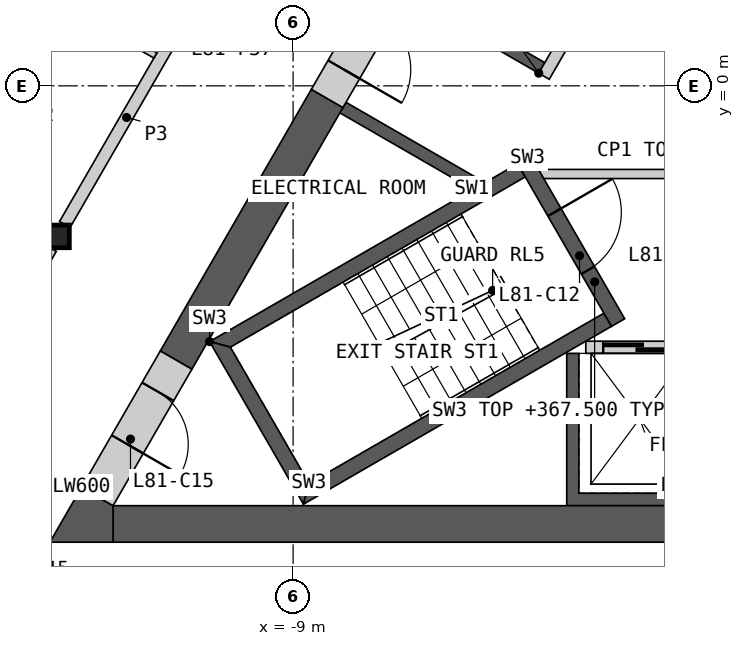
"""IFC4 building model, lengths in metres.
Left out: names, types, materials, properties, quantities, classifications, styles, units other than length and angle.
Written with IfcOpenShell. Run it as: python <this file> out.ifc"""

import sys

from ifc_helpers import new_model, si_unit, direction, frame, frame_2d, origin, origin_2d, place, context, subcontext, project, spatial, polyline, rectangle, i_section, outline, extrude, element, fill, save


model = new_model("IFC4")
c1 = context("Model", 3, precision=1e-05, world=origin(), true_north=direction((0.0, 1.0)))
c2 = subcontext(c1, "Body", "Model", "MODEL_VIEW")
j1 = project(units=[si_unit("LENGTHUNIT", "METRE"), si_unit("PLANEANGLEUNIT", "RADIAN")], contexts=[c1])
p1 = place(None, origin())
s1 = spatial("IfcSite", under=j1, at=p1, CompositionType="ELEMENT")
p2 = place(p1, origin())
s2 = spatial("IfcBuilding", under=s1, at=p2, CompositionType="ELEMENT")
p3 = place(p2, frame((0.0, 0.0, 364.4)))
s3 = spatial("IfcBuildingStorey", under=s2, at=p3, CompositionType="ELEMENT", Elevation=364.4)
p4 = place(p3, frame((-12.868, -2.476, 0.0), z_axis=(0.0, 0.0, 1.0), x_axis=(1.0, 0.0, 0.0)))
e1 = element("IfcColumn", 1, at=p4, inside=s3, PredefinedType="COLUMN", context=c2, shape_type="SweptSolid", body=[
    extrude(i_section(OverallWidth=0.374, OverallDepth=0.372, WebThickness=0.016, FlangeThickness=0.026, at=origin_2d()), origin(), (0.0, 0.0, 1.0), 3.4),
])
p5 = place(p3, origin())
e2 = element("IfcWall", 2, at=p5, inside=s3, PredefinedType="SHEAR", context=c2, shape_type="SweptSolid", body=[
    extrude(outline(polyline([(4.5, -4.4), (4.5, -6.906), (-4.5, -6.906), (-4.5, -4.4), (-4.3, -4.4), (-4.3, -6.7), (-2.3, -6.7), (-2.3, -4.4), (-2.1, -4.4), (-2.1, -6.7), (-0.1, -6.7), (-0.1, -4.4), (0.1, -4.4), (0.1, -6.7), (2.1, -6.7), (2.1, -4.4), (2.3, -4.4), (2.3, -6.7), (4.3, -6.7), (4.3, -4.4), (4.5, -4.4)])), origin(), (0.0, 0.0, 1.0), 3.1),
])
p6 = place(p3, frame((-4.187, -4.3, 0.0), z_axis=(0.0, 0.0, 1.0), x_axis=(1.0, 0.0, 0.0)))
e3 = element("IfcWall", 3, at=p6, inside=s3, PredefinedType="SOLIDWALL", context=c2, shape_type="SweptSolid", body=[
    extrude(rectangle(XDim=8.373, YDim=0.2, at=frame_2d((4.187, 0.0))), origin(), (0.0, 0.0, 1.0), 3.1),
])
p7 = place(p6, frame((0.287, 0.0, 0.0)))
e4 = element("IfcOpeningElement", 4, at=p7, cuts=e3, PredefinedType="OPENING", context=c2, shape_type="SweptSolid", body=[
    extrude(rectangle(XDim=1.2, YDim=2.1, at=frame_2d((0.6, 1.05))), frame((0.0, 0.11, 0.0), z_axis=(0.0, -1.0, 0.0), x_axis=(1.0, 0.0, 0.0)), (0.0, 0.0, 1.0), 0.22),
])
p8 = place(p6, frame((2.387, 0.0, 0.0)))
e5 = element("IfcOpeningElement", 5, at=p8, cuts=e3, PredefinedType="OPENING", context=c2, shape_type="SweptSolid", body=[
    extrude(rectangle(XDim=1.4, YDim=2.1, at=frame_2d((0.7, 1.05))), frame((0.0, 0.11, 0.0), z_axis=(0.0, -1.0, 0.0), x_axis=(1.0, 0.0, 0.0)), (0.0, 0.0, 1.0), 0.22),
])
p9 = place(p6, frame((4.737, 0.0, 0.0)))
e6 = element("IfcOpeningElement", 6, at=p9, cuts=e3, PredefinedType="OPENING", context=c2, shape_type="SweptSolid", body=[
    extrude(rectangle(XDim=1.1, YDim=2.1, at=frame_2d((0.55, 1.05))), frame((0.0, 0.11, 0.0), z_axis=(0.0, -1.0, 0.0), x_axis=(1.0, 0.0, 0.0)), (0.0, 0.0, 1.0), 0.22),
])
p10 = place(p6, frame((6.887, 0.0, 0.0)))
e7 = element("IfcOpeningElement", 7, at=p10, cuts=e3, PredefinedType="OPENING", context=c2, shape_type="SweptSolid", body=[
    extrude(rectangle(XDim=1.2, YDim=2.1, at=frame_2d((0.6, 1.05))), frame((0.0, 0.11, 0.0), z_axis=(0.0, -1.0, 0.0), x_axis=(1.0, 0.0, 0.0)), (0.0, 0.0, 1.0), 0.22),
])
p11 = place(p3, origin())
e8 = element("IfcWall", 8, at=p11, inside=s3, PredefinedType="SHEAR", context=c2, shape_type="SweptSolid", body=[
    extrude(outline(polyline([(-6.061, -1.697), (-8.231, -0.444), (-8.131, -0.271), (-5.96, -1.524), (-6.061, -1.697)])), origin(), (0.0, 0.0, 1.0), 3.1),
])
p12 = place(p3, origin())
e9 = element("IfcWall", 9, at=p12, inside=s3, PredefinedType="SHEAR", context=c2, shape_type="SweptSolid", body=[
    extrude(outline(polyline([(-4.96, 0.208), (-7.131, 1.461), (-3.731, 7.35), (-1.561, 6.097), (-1.66, 5.924), (-3.652, 7.074), (-5.752, 3.437), (-3.76, 2.287), (-3.861, 2.113), (-5.852, 3.263), (-6.852, 1.531), (-4.861, 0.381), (-4.96, 0.208)])), origin(), (0.0, 0.0, 1.0), 3.1),
])
p13 = place(p3, frame((-1.631, 5.776, 0.0), z_axis=(0.0, 0.0, 1.0), x_axis=(-0.499992876559, -0.866029516466, 0.0)))
e10 = element("IfcWall", 10, at=p13, inside=s3, PredefinedType="SOLIDWALL", context=c2, shape_type="SweptSolid", body=[
    extrude(rectangle(XDim=6.486, YDim=0.2, at=frame_2d((3.243, 0.0))), origin(), (0.0, 0.0, 1.0), 3.1),
])
p14 = place(p13, frame((1.537, 0.0, 0.0)))
e11 = element("IfcOpeningElement", 11, at=p14, cuts=e10, PredefinedType="OPENING", context=c2, shape_type="SweptSolid", body=[
    extrude(rectangle(XDim=0.9, YDim=2.1, at=frame_2d((0.45, 1.05))), frame((0.0, 0.11, 0.0), z_axis=(0.0, -1.0, 0.0), x_axis=(1.0, 0.0, 0.0)), (0.0, 0.0, 1.0), 0.22),
])
p15 = place(p13, frame((4.837, 0.0, 0.0)))
e12 = element("IfcOpeningElement", 12, at=p15, cuts=e10, PredefinedType="OPENING", context=c2, shape_type="SweptSolid", body=[
    extrude(rectangle(XDim=0.9, YDim=2.1, at=frame_2d((0.45, 1.05))), frame((0.0, 0.11, 0.0), z_axis=(0.0, -1.0, 0.0), x_axis=(1.0, 0.0, 0.0)), (0.0, 0.0, 1.0), 0.22),
])
p16 = place(p3, frame((-4.941, -1.45, 0.0), z_axis=(0.0, 0.0, 1.0), x_axis=(1.0, 0.0, 0.0)))
e13 = element("IfcWall", 13, at=p16, inside=s3, PredefinedType="PARTITIONING", context=c2, shape_type="SweptSolid", body=[
    extrude(rectangle(XDim=9.882, YDim=0.15, at=frame_2d((4.941, 0.0))), origin(), (0.0, 0.0, 1.0), 3.1),
])
p17 = place(p16, frame((4.391, 0.0, 0.0)))
e14 = element("IfcOpeningElement", 14, at=p17, cuts=e13, PredefinedType="OPENING", context=c2, shape_type="SweptSolid", body=[
    extrude(rectangle(XDim=1.1, YDim=2.1, at=frame_2d((0.55, 1.05))), frame((0.0, 0.085, 0.0), z_axis=(0.0, -1.0, 0.0), x_axis=(1.0, 0.0, 0.0)), (0.0, 0.0, 1.0), 0.17),
])
p18 = place(p3, origin())
e15 = element("IfcWall", 15, at=p18, inside=s3, PredefinedType="SHEAR", context=c2, shape_type="SweptSolid", body=[
    extrude(outline(polyline([(-5.307, -1.281), (-10.374, -4.206), (-10.032, -4.298), (-5.182, -1.498), (-5.307, -1.281)])), origin(), (0.0, 0.0, 1.0), 3.1),
])
p19 = place(p3, origin())
e16 = element("IfcWall", 16, at=p19, inside=s3, PredefinedType="SHEAR", context=c2, shape_type="SweptSolid", body=[
    extrude(outline(polyline([(-10.374, -4.206), (-8.83, -6.881), (-8.738, -6.539), (-10.032, -4.298), (-10.374, -4.206)])), origin(), (0.0, 0.0, 1.0), 3.1),
])
p20 = place(p3, origin())
e17 = element("IfcWall", 17, at=p20, inside=s3, PredefinedType="SHEAR", context=c2, shape_type="SweptSolid", body=[
    extrude(outline(polyline([(-8.738, -6.539), (-8.83, -6.881), (-3.763, -3.956), (-3.888, -3.739), (-8.738, -6.539)])), origin(), (0.0, 0.0, 1.0), 3.1),
])
p21 = place(p3, frame((-5.199, -1.219, 0.0), z_axis=(0.0, 0.0, 1.0), x_axis=(0.499982516597, -0.866035497597, 0.0)))
e18 = element("IfcWall", 18, at=p21, inside=s3, PredefinedType="SHEAR", context=c2, shape_type="SweptSolid", body=[
    extrude(rectangle(XDim=3.088, YDim=0.25, at=frame_2d((1.544, 0.0))), origin(), (0.0, 0.0, 1.0), 3.1),
])
p22 = place(p21, frame((0.994, 0.0, 0.0)))
e19 = element("IfcOpeningElement", 19, at=p22, cuts=e18, PredefinedType="OPENING", context=c2, shape_type="SweptSolid", body=[
    extrude(rectangle(XDim=1.1, YDim=2.1, at=frame_2d((0.55, 1.05))), frame((0.0, 0.135, 0.0), z_axis=(0.0, -1.0, 0.0), x_axis=(1.0, 0.0, 0.0)), (0.0, 0.0, 1.0), 0.27),
])
p23 = place(p3, frame((-11.961, -7.206, 0.0), z_axis=(0.0, 0.0, 1.0), x_axis=(1.0, 0.0, 0.0)))
e20 = element("IfcWall", 20, at=p23, inside=s3, PredefinedType="SHEAR", context=c2, shape_type="SweptSolid", body=[
    extrude(rectangle(XDim=23.921, YDim=0.6, at=frame_2d((11.961, 0.0))), origin(), (0.0, 0.0, 1.0), 3.1),
])
p24 = place(p3, frame((-8.44, -0.208, 0.0), z_axis=(0.0, 0.0, 1.0), x_axis=(-0.500007425856, -0.866021116422, 0.0)))
e21 = element("IfcWall", 21, at=p24, inside=s3, PredefinedType="SHEAR", context=c2, shape_type="SweptSolid", body=[
    extrude(rectangle(XDim=4.969, YDim=0.6, at=frame_2d((2.484, 0.0))), origin(), (0.0, 0.0, 1.0), 3.1),
])
p25 = place(p3, origin())
e22 = element("IfcWall", 22, at=p25, inside=s3, PredefinedType="SHEAR", context=c2, shape_type="SweptSolid", body=[
    extrude(outline(polyline([(-12.48, -6.606), (-11.961, -6.906), (-11.961, -7.506), (-13.0, -7.506), (-12.48, -6.606)])), origin(), (0.0, 0.0, 1.0), 3.1),
])
p26 = place(p3, frame((-10.925, -4.511, 0.0), z_axis=(0.0, 0.0, 1.0), x_axis=(-0.500018667571, -0.866014625789, 0.0)))
e23 = element("IfcWall", 23, at=p26, inside=s3, PredefinedType="SHEAR", context=c2, shape_type="SweptSolid", body=[
    extrude(rectangle(XDim=2.592, YDim=0.6, at=frame_2d((1.296, 0.0))), origin(), (0.0, 0.0, 1.0), 3.1),
])
p27 = place(p26, frame((0.6, 0.0, 0.0)))
e24 = element("IfcOpeningElement", 24, at=p27, cuts=e23, PredefinedType="OPENING", context=c2, shape_type="SweptSolid", body=[
    extrude(rectangle(XDim=1.0, YDim=2.1, at=frame_2d((0.5, 1.05))), frame((0.0, 0.31, 0.0), z_axis=(0.0, -1.0, 0.0), x_axis=(1.0, 0.0, 0.0)), (0.0, 0.0, 1.0), 0.62),
])
p28 = place(p3, frame((-7.34, 1.698, 0.0), z_axis=(0.0, 0.0, 1.0), x_axis=(-0.50002983664, -0.866008176907, 0.0)))
e25 = element("IfcWall", 25, at=p28, inside=s3, PredefinedType="SHEAR", context=c2, shape_type="SweptSolid", body=[
    extrude(rectangle(XDim=2.2, YDim=0.6, at=frame_2d((1.1, 0.0))), origin(), (0.0, 0.0, 1.0), 3.1),
])
p29 = place(p28, frame((0.55, 0.0, 0.0)))
e26 = element("IfcOpeningElement", 26, at=p29, cuts=e25, PredefinedType="OPENING", context=c2, shape_type="SweptSolid", body=[
    extrude(rectangle(XDim=1.1, YDim=2.1, at=frame_2d((0.55, 1.05))), frame((0.0, 0.31, 0.0), z_axis=(0.0, -1.0, 0.0), x_axis=(1.0, 0.0, 0.0)), (0.0, 0.0, 1.0), 0.62),
])
p30 = place(p3, frame((-12.754, -2.279, 0.0), z_axis=(0.0, 0.0, 1.0), x_axis=(0.500001682468, 0.866024432409, 0.0)))
e27 = element("IfcWall", 27, at=p30, inside=s3, PredefinedType="PARTITIONING", context=c2, shape_type="SweptSolid", body=[
    extrude(rectangle(XDim=8.124, YDim=0.2, at=frame_2d((4.062, 0.0))), origin(), (0.0, 0.0, 1.0), 3.1),
])
p31 = place(p30, frame((3.762, 0.0, 0.0)))
e28 = element("IfcOpeningElement", 28, at=p31, cuts=e27, PredefinedType="OPENING", context=c2, shape_type="SweptSolid", body=[
    extrude(rectangle(XDim=1.0, YDim=2.1, at=frame_2d((0.5, 1.05))), frame((0.0, 0.11, 0.0), z_axis=(0.0, -1.0, 0.0), x_axis=(1.0, 0.0, 0.0)), (0.0, 0.0, 1.0), 0.22),
])
p32 = place(p3, frame((-15.131, -6.397, 0.0), z_axis=(0.0, 0.0, 1.0), x_axis=(0.499986217557, 0.866033360935, 0.0)))
e29 = element("IfcWall", 29, at=p32, inside=s3, PredefinedType="PARTITIONING", context=c2, shape_type="SweptSolid", body=[
    extrude(rectangle(XDim=4.3, YDim=0.2, at=frame_2d((2.15, 0.0))), origin(), (0.0, 0.0, 1.0), 3.1),
])
p33 = place(p3, frame((-17.414, 4.049, 0.0), z_axis=(0.0, 0.0, 1.0), x_axis=(0.866033839264, -0.499985389037, 0.0)))
e30 = element("IfcWall", 30, at=p33, inside=s3, PredefinedType="PARTITIONING", context=c2, shape_type="SweptSolid", body=[
    extrude(rectangle(XDim=7.1, YDim=0.1, at=frame_2d((3.55, 0.0))), origin(), (0.0, 0.0, 1.0), 2.33),
])
p34 = place(p33, frame((1.158, 0.0, 0.0)))
e31 = element("IfcOpeningElement", 31, at=p34, cuts=e30, PredefinedType="OPENING", context=c2, shape_type="SweptSolid", body=[
    extrude(rectangle(XDim=0.95, YDim=2.1, at=frame_2d((0.475, 1.05))), frame((0.0, 0.06, 0.0), z_axis=(0.0, -1.0, 0.0), x_axis=(1.0, 0.0, 0.0)), (0.0, 0.0, 1.0), 0.12),
])
p35 = place(p7, origin())
e32 = element("IfcDoor", 32, at=p35, inside=s3, OperationType="SLIDING_TO_LEFT", PredefinedType="DOOR", context=c2, shape_type="SweptSolid", body=[
    extrude(rectangle(XDim=1.2, YDim=2.1, at=frame_2d((0.6, 1.05))), frame((0.0, 0.025, 0.0), z_axis=(0.0, -1.0, 0.0), x_axis=(1.0, 0.0, 0.0)), (0.0, 0.0, 1.0), 0.05),
])
fill(e4, e32)
p36 = place(p22, origin())
e33 = element("IfcDoor", 33, at=p36, inside=s3, OperationType="SINGLE_SWING_LEFT", PredefinedType="DOOR", context=c2, shape_type="SweptSolid", body=[
    extrude(rectangle(XDim=1.1, YDim=2.1, at=frame_2d((0.55, 1.05))), frame((0.0, 0.025, 0.0), z_axis=(0.0, -1.0, 0.0), x_axis=(1.0, 0.0, 0.0)), (0.0, 0.0, 1.0), 0.05),
])
fill(e19, e33)
p37 = place(p27, origin())
e34 = element("IfcDoor", 34, at=p37, inside=s3, OperationType="SINGLE_SWING_RIGHT", PredefinedType="DOOR", context=c2, shape_type="SweptSolid", body=[
    extrude(rectangle(XDim=1.0, YDim=2.1, at=frame_2d((0.5, 1.05))), frame((0.0, 0.055, 0.0), z_axis=(0.0, -1.0, 0.0), x_axis=(1.0, 0.0, 0.0)), (0.0, 0.0, 1.0), 0.05),
])
fill(e24, e34)
p38 = place(p29, origin())
e35 = element("IfcDoor", 35, at=p38, inside=s3, OperationType="SINGLE_SWING_RIGHT", PredefinedType="DOOR", context=c2, shape_type="SweptSolid", body=[
    extrude(rectangle(XDim=1.1, YDim=2.1, at=frame_2d((0.55, 1.05))), frame((0.0, 0.055, 0.0), z_axis=(0.0, -1.0, 0.0), x_axis=(1.0, 0.0, 0.0)), (0.0, 0.0, 1.0), 0.05),
])
fill(e26, e35)
save(model, sys.argv[1])
